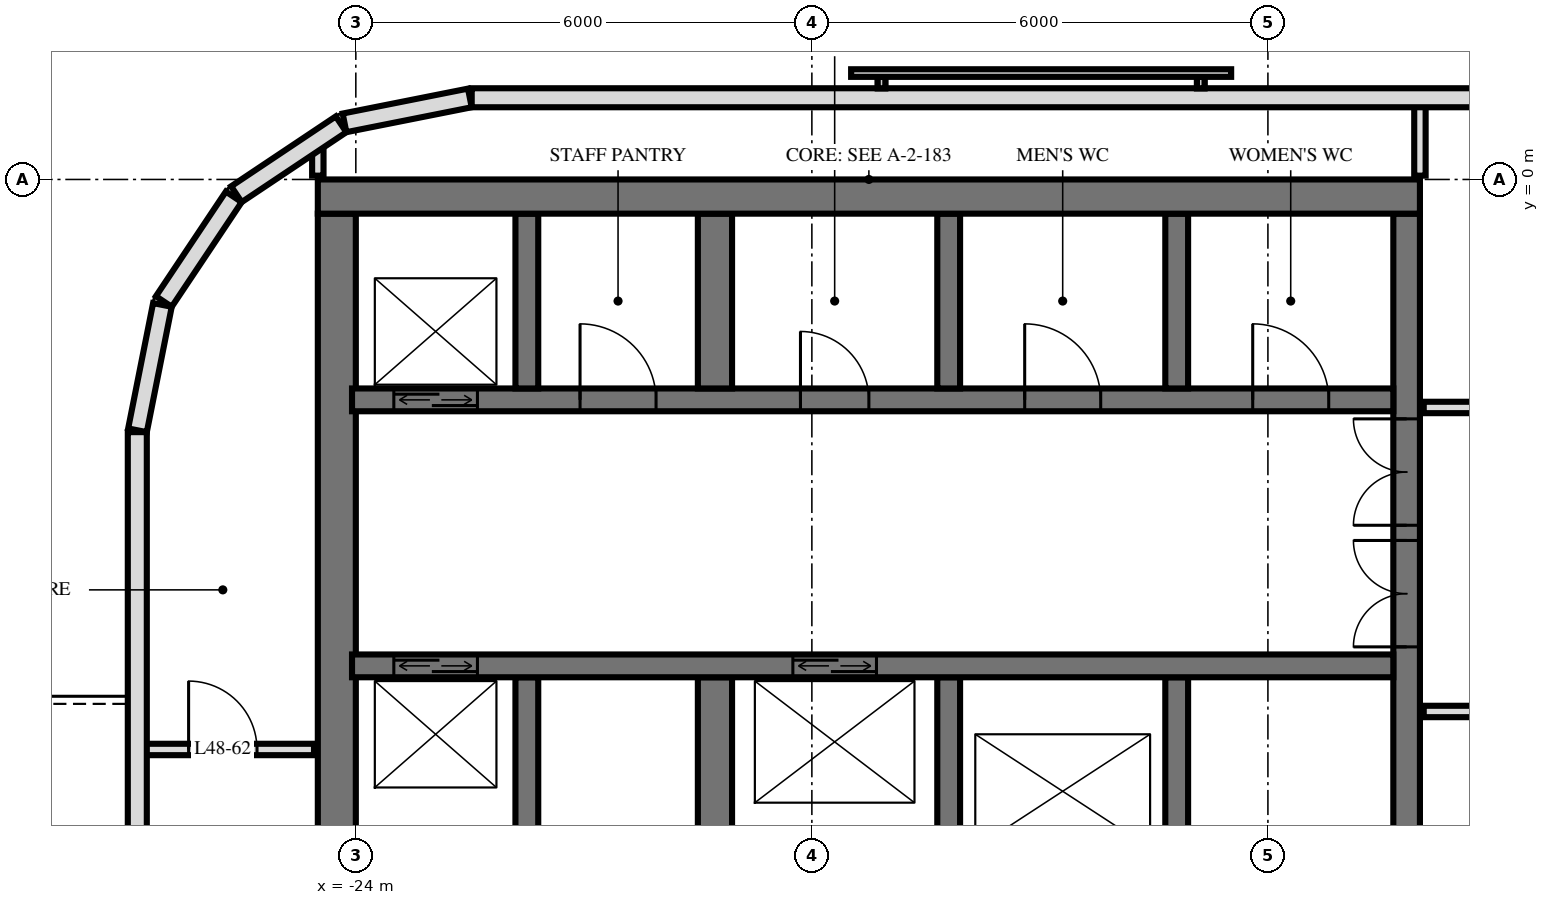
"""IFC4 building model, lengths in metres.
Left out: names, types, materials, properties, quantities, classifications, styles, units other than length and angle.
Written with IfcOpenShell. Run it as: python <this file> out.ifc"""

import sys

from ifc_helpers import new_model, si_unit, direction, frame, frame_2d, origin, place, context, subcontext, project, spatial, rectangle, extrude, element, fill, save


model = new_model("IFC4")
c1 = context("Model", 3, precision=1e-05, world=origin(), true_north=direction((0.0, 1.0)))
c2 = subcontext(c1, "Body", "Model", "MODEL_VIEW")
j1 = project(units=[si_unit("LENGTHUNIT", "METRE"), si_unit("PLANEANGLEUNIT", "RADIAN")], contexts=[c1])
p1 = place(None, origin())
s1 = spatial("IfcSite", under=j1, at=p1, CompositionType="ELEMENT")
p2 = place(p1, origin())
s2 = spatial("IfcBuilding", under=s1, at=p2, CompositionType="ELEMENT")
p3 = place(p2, frame((0.0, 0.0, 187.1)))
s3 = spatial("IfcBuildingStorey", under=s2, at=p3, CompositionType="ELEMENT", Elevation=187.1)
p4 = place(p3, frame((-24.5, -0.225, 0.0), z_axis=(0.0, 0.0, 1.0), x_axis=(1.0, 0.0, 0.0)))
e1 = element("IfcWall", 1, at=p4, inside=s3, PredefinedType="SHEAR", context=c2, shape_type="SweptSolid", body=[
    extrude(rectangle(XDim=14.5, YDim=0.45, at=frame_2d((7.25, 0.0))), origin(), (0.0, 0.0, 1.0), 3.5),
])
p5 = place(p3, frame((-10.175, -14.55, 0.0), z_axis=(0.0, 0.0, 1.0), x_axis=(0.0, 1.0, 0.0)))
e2 = element("IfcWall", 2, at=p5, inside=s3, PredefinedType="SHEAR", context=c2, shape_type="SweptSolid", body=[
    extrude(rectangle(XDim=14.1, YDim=0.35, at=frame_2d((7.05, 0.0))), origin(), (0.0, 0.0, 1.0), 3.5),
])
p6 = place(p5, frame((8.4, 0.0, 0.0)))
e3 = element("IfcOpeningElement", 3, at=p6, cuts=e2, PredefinedType="OPENING", context=c2, shape_type="SweptSolid", body=[
    extrude(rectangle(XDim=1.4, YDim=2.4, at=frame_2d((0.7, 1.2))), frame((0.0, 0.185, 0.0), z_axis=(0.0, -1.0, 0.0), x_axis=(1.0, 0.0, 0.0)), (0.0, 0.0, 1.0), 0.37),
])
p7 = place(p5, frame((10.0, 0.0, 0.0)))
e4 = element("IfcOpeningElement", 4, at=p7, cuts=e2, PredefinedType="OPENING", context=c2, shape_type="SweptSolid", body=[
    extrude(rectangle(XDim=1.4, YDim=2.4, at=frame_2d((0.7, 1.2))), frame((0.0, 0.185, 0.0), z_axis=(0.0, -1.0, 0.0), x_axis=(1.0, 0.0, 0.0)), (0.0, 0.0, 1.0), 0.37),
])
p8 = place(p5, frame((4.0, 0.0, 0.0)))
e5 = element("IfcOpeningElement", 5, at=p8, cuts=e2, PredefinedType="OPENING", context=c2, shape_type="SweptSolid", body=[
    extrude(rectangle(XDim=1.2, YDim=2.1, at=frame_2d((0.6, 1.05))), frame((0.0, 0.185, 0.0), z_axis=(0.0, -1.0, 0.0), x_axis=(1.0, 0.0, 0.0)), (0.0, 0.0, 1.0), 0.37),
])
p9 = place(p3, frame((-24.25, -14.55, 0.0), z_axis=(0.0, 0.0, 1.0), x_axis=(0.0, 1.0, 0.0)))
e6 = element("IfcWall", 6, at=p9, inside=s3, PredefinedType="SHEAR", context=c2, shape_type="SweptSolid", body=[
    extrude(rectangle(XDim=14.1, YDim=0.5, at=frame_2d((7.05, 0.0))), origin(), (0.0, 0.0, 1.0), 3.5),
])
p10 = place(p3, frame((-24.05, -2.9, 0.0), z_axis=(0.0, 0.0, 1.0), x_axis=(1.0, 0.0, 0.0)))
e7 = element("IfcWall", 7, at=p10, inside=s3, PredefinedType="SHEAR", context=c2, shape_type="SweptSolid", body=[
    extrude(rectangle(XDim=13.7, YDim=0.3, at=frame_2d((6.85, 0.0))), origin(), (0.0, 0.0, 1.0), 3.5),
])
p11 = place(p10, frame((0.55, 0.0, 0.0)))
e8 = element("IfcOpeningElement", 8, at=p11, cuts=e7, PredefinedType="OPENING", context=c2, shape_type="SweptSolid", body=[
    extrude(rectangle(XDim=1.1, YDim=2.1, at=frame_2d((0.55, 1.05))), frame((0.0, 0.16, 0.0), z_axis=(0.0, -1.0, 0.0), x_axis=(1.0, 0.0, 0.0)), (0.0, 0.0, 1.0), 0.32),
])
p12 = place(p10, frame((5.9, 0.0, 0.0)))
e9 = element("IfcOpeningElement", 9, at=p12, cuts=e7, PredefinedType="OPENING", context=c2, shape_type="SweptSolid", body=[
    extrude(rectangle(XDim=0.9, YDim=2.1, at=frame_2d((0.45, 1.05))), frame((0.0, 0.16, 0.0), z_axis=(0.0, -1.0, 0.0), x_axis=(1.0, 0.0, 0.0)), (0.0, 0.0, 1.0), 0.32),
])
p13 = place(p10, frame((11.85, 0.0, 0.0)))
e10 = element("IfcOpeningElement", 10, at=p13, cuts=e7, PredefinedType="OPENING", context=c2, shape_type="SweptSolid", body=[
    extrude(rectangle(XDim=1.0, YDim=2.1, at=frame_2d((0.5, 1.05))), frame((0.0, 0.16, 0.0), z_axis=(0.0, -1.0, 0.0), x_axis=(1.0, 0.0, 0.0)), (0.0, 0.0, 1.0), 0.32),
])
p14 = place(p10, frame((8.85, 0.0, 0.0)))
e11 = element("IfcOpeningElement", 11, at=p14, cuts=e7, PredefinedType="OPENING", context=c2, shape_type="SweptSolid", body=[
    extrude(rectangle(XDim=1.0, YDim=2.1, at=frame_2d((0.5, 1.05))), frame((0.0, 0.16, 0.0), z_axis=(0.0, -1.0, 0.0), x_axis=(1.0, 0.0, 0.0)), (0.0, 0.0, 1.0), 0.32),
])
p15 = place(p10, frame((3.0, 0.0, 0.0)))
e12 = element("IfcOpeningElement", 12, at=p15, cuts=e7, PredefinedType="OPENING", context=c2, shape_type="SweptSolid", body=[
    extrude(rectangle(XDim=1.0, YDim=2.1, at=frame_2d((0.5, 1.05))), frame((0.0, 0.16, 0.0), z_axis=(0.0, -1.0, 0.0), x_axis=(1.0, 0.0, 0.0)), (0.0, 0.0, 1.0), 0.32),
])
p16 = place(p3, frame((-24.05, -6.4, 0.0), z_axis=(0.0, 0.0, 1.0), x_axis=(1.0, 0.0, 0.0)))
e13 = element("IfcWall", 13, at=p16, inside=s3, PredefinedType="SHEAR", context=c2, shape_type="SweptSolid", body=[
    extrude(rectangle(XDim=13.7, YDim=0.3, at=frame_2d((6.85, 0.0))), origin(), (0.0, 0.0, 1.0), 3.5),
])
p17 = place(p16, frame((0.55, 0.0, 0.0)))
e14 = element("IfcOpeningElement", 14, at=p17, cuts=e13, PredefinedType="OPENING", context=c2, shape_type="SweptSolid", body=[
    extrude(rectangle(XDim=1.1, YDim=2.1, at=frame_2d((0.55, 1.05))), frame((0.0, 0.16, 0.0), z_axis=(0.0, -1.0, 0.0), x_axis=(1.0, 0.0, 0.0)), (0.0, 0.0, 1.0), 0.32),
])
p18 = place(p16, frame((5.8, 0.0, 0.0)))
e15 = element("IfcOpeningElement", 15, at=p18, cuts=e13, PredefinedType="OPENING", context=c2, shape_type="SweptSolid", body=[
    extrude(rectangle(XDim=1.1, YDim=2.1, at=frame_2d((0.55, 1.05))), frame((0.0, 0.16, 0.0), z_axis=(0.0, -1.0, 0.0), x_axis=(1.0, 0.0, 0.0)), (0.0, 0.0, 1.0), 0.32),
])
for number, where, z_axis, x_axis in (
    (16, (-13.2, -2.75, 0.0), (0.0, 0.0, 1.0), (0.0, 1.0, 0.0)),
    (17, (-13.2, -8.85, 0.0), (0.0, 0.0, 1.0), (0.0, 1.0, 0.0)),
    (18, (-16.2, -2.75, 0.0), (0.0, 0.0, 1.0), (0.0, 1.0, 0.0)),
    (19, (-16.2, -8.85, 0.0), (0.0, 0.0, 1.0), (0.0, 1.0, 0.0)),
):
    element("IfcWall", number, at=place(p3, frame(where, z_axis=z_axis, x_axis=x_axis)), inside=s3, PredefinedType="SHEAR", context=c2, shape_type="SweptSolid", body=[
        extrude(rectangle(XDim=2.3, YDim=0.3, at=frame_2d((1.15, 0.0))), origin(), (0.0, 0.0, 1.0), 3.5),
    ])
for number, where, z_axis, x_axis in (
    (20, (-19.275, -2.75, 0.0), (0.0, 0.0, 1.0), (0.0, 1.0, 0.0)),
    (21, (-19.275, -8.85, 0.0), (0.0, 0.0, 1.0), (0.0, 1.0, 0.0)),
):
    element("IfcWall", number, at=place(p3, frame(where, z_axis=z_axis, x_axis=x_axis)), inside=s3, PredefinedType="SHEAR", context=c2, shape_type="SweptSolid", body=[
        extrude(rectangle(XDim=2.3, YDim=0.45, at=frame_2d((1.15, 0.0))), origin(), (0.0, 0.0, 1.0), 3.5),
    ])
for number, where, z_axis, x_axis in (
    (22, (-21.75, -2.75, 0.0), (0.0, 0.0, 1.0), (0.0, 1.0, 0.0)),
    (23, (-21.75, -8.85, 0.0), (0.0, 0.0, 1.0), (0.0, 1.0, 0.0)),
):
    element("IfcWall", number, at=place(p3, frame(where, z_axis=z_axis, x_axis=x_axis)), inside=s3, PredefinedType="SHEAR", context=c2, shape_type="SweptSolid", body=[
        extrude(rectangle(XDim=2.3, YDim=0.3, at=frame_2d((1.15, 0.0))), origin(), (0.0, 0.0, 1.0), 3.5),
    ])
p19 = place(p3, frame((22.475, 1.075, 0.0), z_axis=(0.0, 0.0, 1.0), x_axis=(-1.0, 0.0, 0.0)))
e24 = element("IfcWall", 24, at=p19, inside=s3, PredefinedType="SOLIDWALL", context=c2, shape_type="SweptSolid", body=[
    extrude(rectangle(XDim=44.951, YDim=0.25, at=frame_2d((22.475, 0.0))), origin(), (0.0, 0.0, 1.0), 3.22),
])
p20 = place(p19, frame((15.275, 0.0, 0.9)))
e25 = element("IfcOpeningElement", 25, at=p20, cuts=e24, PredefinedType="OPENING", context=c2, shape_type="SweptSolid", body=[
    extrude(rectangle(XDim=2.4, YDim=1.5, at=frame_2d((1.2, 0.75))), frame((0.0, 0.135, 0.0), z_axis=(0.0, -1.0, 0.0), x_axis=(1.0, 0.0, 0.0)), (0.0, 0.0, 1.0), 0.27),
])
p21 = place(p19, frame((21.275, 0.0, 0.9)))
e26 = element("IfcOpeningElement", 26, at=p21, cuts=e24, PredefinedType="OPENING", context=c2, shape_type="SweptSolid", body=[
    extrude(rectangle(XDim=2.4, YDim=1.5, at=frame_2d((1.2, 0.75))), frame((0.0, 0.135, 0.0), z_axis=(0.0, -1.0, 0.0), x_axis=(1.0, 0.0, 0.0)), (0.0, 0.0, 1.0), 0.27),
])
p22 = place(p19, frame((24.275, 0.0, 0.9)))
e27 = element("IfcOpeningElement", 27, at=p22, cuts=e24, PredefinedType="OPENING", context=c2, shape_type="SweptSolid", body=[
    extrude(rectangle(XDim=2.4, YDim=1.5, at=frame_2d((1.2, 0.75))), frame((0.0, 0.135, 0.0), z_axis=(0.0, -1.0, 0.0), x_axis=(1.0, 0.0, 0.0)), (0.0, 0.0, 1.0), 0.27),
])
p23 = place(p3, frame((-22.5, 1.073, 0.0), z_axis=(0.0, 0.0, 1.0), x_axis=(-0.980803419081, -0.194999110559, 0.0)))
e28 = element("IfcWall", 28, at=p23, inside=s3, PredefinedType="SOLIDWALL", context=c2, shape_type="SweptSolid", body=[
    extrude(rectangle(XDim=1.681, YDim=0.25, at=frame_2d((0.841, 0.0))), origin(), (0.0, 0.0, 1.0), 3.22),
])
for number, where, z_axis, x_axis in (
    (29, (-24.194, 0.726, 0.0), (0.0, 0.0, 1.0), (-0.831, -0.556, 0.0)),
    (30, (-25.606, -0.229, 0.0), (0.0, 0.0, 1.0), (-0.556, -0.831, 0.0)),
):
    element("IfcWall", number, at=place(p3, frame(where, z_axis=z_axis, x_axis=x_axis)), inside=s3, PredefinedType="SOLIDWALL", context=c2, shape_type="SweptSolid", body=[
        extrude(rectangle(XDim=1.656, YDim=0.25, at=frame_2d((0.828, 0.0))), origin(), (0.0, 0.0, 1.0), 3.22),
    ])
p24 = place(p3, frame((-26.545, -1.651, 0.0), z_axis=(0.0, 0.0, 1.0), x_axis=(-0.194999110559, -0.980803419081, 0.0)))
e31 = element("IfcWall", 31, at=p24, inside=s3, PredefinedType="SOLIDWALL", context=c2, shape_type="SweptSolid", body=[
    extrude(rectangle(XDim=1.681, YDim=0.25, at=frame_2d((0.841, 0.0))), origin(), (0.0, 0.0, 1.0), 3.22),
])
p25 = place(p3, frame((-26.875, -3.325, 0.0), z_axis=(0.0, 0.0, 1.0), x_axis=(0.0, -1.0, 0.0)))
e32 = element("IfcWall", 32, at=p25, inside=s3, PredefinedType="SOLIDWALL", context=c2, shape_type="SweptSolid", body=[
    extrude(rectangle(XDim=21.551, YDim=0.25, at=frame_2d((10.775, 0.0))), origin(), (0.0, 0.0, 1.0), 3.22),
])
p26 = place(p25, frame((7.025, 0.0, 0.0)))
e33 = element("IfcOpeningElement", 33, at=p26, cuts=e32, PredefinedType="OPENING", context=c2, shape_type="SweptSolid", body=[
    extrude(rectangle(XDim=1.8, YDim=2.4, at=frame_2d((0.9, 1.2))), frame((0.0, 0.135, 0.0), z_axis=(0.0, -1.0, 0.0), x_axis=(1.0, 0.0, 0.0)), (0.0, 0.0, 1.0), 0.27),
])
p27 = place(p25, frame((14.075, 0.0, 0.0)))
e34 = element("IfcOpeningElement", 34, at=p27, cuts=e32, PredefinedType="OPENING", context=c2, shape_type="SweptSolid", body=[
    extrude(rectangle(XDim=1.8, YDim=2.4, at=frame_2d((0.9, 1.2))), frame((0.0, 0.135, 0.0), z_axis=(0.0, -1.0, 0.0), x_axis=(1.0, 0.0, 0.0)), (0.0, 0.0, 1.0), 0.27),
])
p28 = place(p25, frame((18.875, 0.0, 0.0)))
e35 = element("IfcOpeningElement", 35, at=p28, cuts=e32, PredefinedType="OPENING", context=c2, shape_type="SweptSolid", body=[
    extrude(rectangle(XDim=1.8, YDim=2.4, at=frame_2d((0.9, 1.2))), frame((0.0, 0.135, 0.0), z_axis=(0.0, -1.0, 0.0), x_axis=(1.0, 0.0, 0.0)), (0.0, 0.0, 1.0), 0.27),
])
p29 = place(p3, frame((-10.0, 0.05, 0.0), z_axis=(0.0, 0.0, 1.0), x_axis=(0.0, 1.0, 0.0)))
e36 = element("IfcWall", 36, at=p29, inside=s3, PredefinedType="PLUMBINGWALL", context=c2, shape_type="SweptSolid", body=[
    extrude(rectangle(XDim=0.97, YDim=0.15, at=frame_2d((0.485, 0.0))), origin(), (0.0, 0.0, 1.0), 3.22),
])
p30 = place(p3, frame((-24.5, 0.05, 0.0), z_axis=(0.0, 0.0, 1.0), x_axis=(0.0, 1.0, 0.0)))
e37 = element("IfcWall", 37, at=p30, inside=s3, PredefinedType="PARTITIONING", context=c2, shape_type="SweptSolid", body=[
    extrude(rectangle(XDim=0.405, YDim=0.15, at=frame_2d((0.203, 0.0))), origin(), (0.0, 0.0, 1.0), 3.22),
])
p31 = place(p3, frame((-26.82, -7.5, 0.0), z_axis=(0.0, 0.0, 1.0), x_axis=(1.0, 0.0, 0.0)))
e38 = element("IfcWall", 38, at=p31, inside=s3, PredefinedType="PARTITIONING", context=c2, shape_type="SweptSolid", body=[
    extrude(rectangle(XDim=2.27, YDim=0.15, at=frame_2d((1.135, 0.0))), origin(), (0.0, 0.0, 1.0), 3.22),
])
p32 = place(p31, frame((0.62, 0.0, 0.0)))
e39 = element("IfcOpeningElement", 39, at=p32, cuts=e38, PredefinedType="OPENING", context=c2, shape_type="SweptSolid", body=[
    extrude(rectangle(XDim=0.9, YDim=2.1, at=frame_2d((0.45, 1.05))), frame((0.0, 0.085, 0.0), z_axis=(0.0, -1.0, 0.0), x_axis=(1.0, 0.0, 0.0)), (0.0, 0.0, 1.0), 0.17),
])
p33 = place(p3, frame((-9.95, -7.0, 0.0), z_axis=(0.0, 0.0, 1.0), x_axis=(1.0, 0.0, 0.0)))
e40 = element("IfcWall", 40, at=p33, inside=s3, PredefinedType="PARTITIONING", context=c2, shape_type="SweptSolid", body=[
    extrude(rectangle(XDim=19.9, YDim=0.15, at=frame_2d((9.95, 0.0))), origin(), (0.0, 0.0, 1.0), 3.22),
])
p34 = place(p33, frame((9.45, 0.0, 0.0)))
e41 = element("IfcOpeningElement", 41, at=p34, cuts=e40, PredefinedType="OPENING", context=c2, shape_type="SweptSolid", body=[
    extrude(rectangle(XDim=1.0, YDim=2.1, at=frame_2d((0.5, 1.05))), frame((0.0, 0.085, 0.0), z_axis=(0.0, -1.0, 0.0), x_axis=(1.0, 0.0, 0.0)), (0.0, 0.0, 1.0), 0.17),
])
p35 = place(p33, frame((3.45, 0.0, 0.0)))
e42 = element("IfcOpeningElement", 42, at=p35, cuts=e40, PredefinedType="OPENING", context=c2, shape_type="SweptSolid", body=[
    extrude(rectangle(XDim=1.0, YDim=2.1, at=frame_2d((0.5, 1.05))), frame((0.0, 0.085, 0.0), z_axis=(0.0, -1.0, 0.0), x_axis=(1.0, 0.0, 0.0)), (0.0, 0.0, 1.0), 0.17),
])
p36 = place(p3, frame((-9.95, -3.0, 0.0), z_axis=(0.0, 0.0, 1.0), x_axis=(1.0, 0.0, 0.0)))
e43 = element("IfcWall", 43, at=p36, inside=s3, PredefinedType="PARTITIONING", context=c2, shape_type="SweptSolid", body=[
    extrude(rectangle(XDim=19.9, YDim=0.15, at=frame_2d((9.95, 0.0))), origin(), (0.0, 0.0, 1.0), 3.22),
])
p37 = place(p36, frame((0.95, 0.0, 0.0)))
e44 = element("IfcOpeningElement", 44, at=p37, cuts=e43, PredefinedType="OPENING", context=c2, shape_type="SweptSolid", body=[
    extrude(rectangle(XDim=1.0, YDim=2.1, at=frame_2d((0.5, 1.05))), frame((0.0, 0.085, 0.0), z_axis=(0.0, -1.0, 0.0), x_axis=(1.0, 0.0, 0.0)), (0.0, 0.0, 1.0), 0.17),
])
p38 = place(p36, frame((3.7, 0.0, 0.0)))
e45 = element("IfcOpeningElement", 45, at=p38, cuts=e43, PredefinedType="OPENING", context=c2, shape_type="SweptSolid", body=[
    extrude(rectangle(XDim=1.0, YDim=2.1, at=frame_2d((0.5, 1.05))), frame((0.0, 0.085, 0.0), z_axis=(0.0, -1.0, 0.0), x_axis=(1.0, 0.0, 0.0)), (0.0, 0.0, 1.0), 0.17),
])
p39 = place(p36, frame((8.45, 0.0, 0.0)))
e46 = element("IfcOpeningElement", 46, at=p39, cuts=e43, PredefinedType="OPENING", context=c2, shape_type="SweptSolid", body=[
    extrude(rectangle(XDim=1.0, YDim=2.1, at=frame_2d((0.5, 1.05))), frame((0.0, 0.085, 0.0), z_axis=(0.0, -1.0, 0.0), x_axis=(1.0, 0.0, 0.0)), (0.0, 0.0, 1.0), 0.17),
])
p40 = place(p36, frame((15.7, 0.0, 0.0)))
e47 = element("IfcOpeningElement", 47, at=p40, cuts=e43, PredefinedType="OPENING", context=c2, shape_type="SweptSolid", body=[
    extrude(rectangle(XDim=1.0, YDim=2.1, at=frame_2d((0.5, 1.05))), frame((0.0, 0.085, 0.0), z_axis=(0.0, -1.0, 0.0), x_axis=(1.0, 0.0, 0.0)), (0.0, 0.0, 1.0), 0.17),
])
p41 = place(p11, origin())
e48 = element("IfcDoor", 48, at=p41, inside=s3, OperationType="DOUBLE_DOOR_SLIDING", PredefinedType="USERDEFINED", context=c2, shape_type="SweptSolid", body=[
    extrude(rectangle(XDim=1.1, YDim=2.1, at=frame_2d((0.55, 1.05))), frame((0.0, 0.025, 0.0), z_axis=(0.0, -1.0, 0.0), x_axis=(1.0, 0.0, 0.0)), (0.0, 0.0, 1.0), 0.05),
])
fill(e8, e48)
p42 = place(p17, origin())
e49 = element("IfcDoor", 49, at=p42, inside=s3, OperationType="DOUBLE_DOOR_SLIDING", PredefinedType="USERDEFINED", context=c2, shape_type="SweptSolid", body=[
    extrude(rectangle(XDim=1.1, YDim=2.1, at=frame_2d((0.55, 1.05))), frame((0.0, 0.025, 0.0), z_axis=(0.0, -1.0, 0.0), x_axis=(1.0, 0.0, 0.0)), (0.0, 0.0, 1.0), 0.05),
])
fill(e14, e49)
p43 = place(p18, origin())
e50 = element("IfcDoor", 50, at=p43, inside=s3, OperationType="DOUBLE_DOOR_SLIDING", PredefinedType="USERDEFINED", context=c2, shape_type="SweptSolid", body=[
    extrude(rectangle(XDim=1.1, YDim=2.1, at=frame_2d((0.55, 1.05))), frame((0.0, 0.025, 0.0), z_axis=(0.0, -1.0, 0.0), x_axis=(1.0, 0.0, 0.0)), (0.0, 0.0, 1.0), 0.05),
])
fill(e15, e50)
p44 = place(p6, origin())
e51 = element("IfcDoor", 51, at=p44, inside=s3, OperationType="DOUBLE_DOOR_SINGLE_SWING", PredefinedType="DOOR", context=c2, shape_type="SweptSolid", body=[
    extrude(rectangle(XDim=1.4, YDim=2.4, at=frame_2d((0.7, 1.2))), frame((0.0, 0.025, 0.0), z_axis=(0.0, -1.0, 0.0), x_axis=(1.0, 0.0, 0.0)), (0.0, 0.0, 1.0), 0.05),
])
fill(e3, e51)
p45 = place(p7, origin())
e52 = element("IfcDoor", 52, at=p45, inside=s3, OperationType="DOUBLE_DOOR_SINGLE_SWING", PredefinedType="DOOR", context=c2, shape_type="SweptSolid", body=[
    extrude(rectangle(XDim=1.4, YDim=2.4, at=frame_2d((0.7, 1.2))), frame((0.0, 0.025, 0.0), z_axis=(0.0, -1.0, 0.0), x_axis=(1.0, 0.0, 0.0)), (0.0, 0.0, 1.0), 0.05),
])
fill(e4, e52)
p46 = place(p12, origin())
e53 = element("IfcDoor", 53, at=p46, inside=s3, OperationType="SINGLE_SWING_RIGHT", PredefinedType="DOOR", context=c2, shape_type="SweptSolid", body=[
    extrude(rectangle(XDim=0.9, YDim=2.1, at=frame_2d((0.45, 1.05))), frame((0.0, 0.025, 0.0), z_axis=(0.0, -1.0, 0.0), x_axis=(1.0, 0.0, 0.0)), (0.0, 0.0, 1.0), 0.05),
])
fill(e9, e53)
p47 = place(p13, origin())
e54 = element("IfcDoor", 54, at=p47, inside=s3, OperationType="SINGLE_SWING_RIGHT", PredefinedType="DOOR", context=c2, shape_type="SweptSolid", body=[
    extrude(rectangle(XDim=1.0, YDim=2.1, at=frame_2d((0.5, 1.05))), frame((0.0, 0.025, 0.0), z_axis=(0.0, -1.0, 0.0), x_axis=(1.0, 0.0, 0.0)), (0.0, 0.0, 1.0), 0.05),
])
fill(e10, e54)
p48 = place(p14, origin())
e55 = element("IfcDoor", 55, at=p48, inside=s3, OperationType="SINGLE_SWING_RIGHT", PredefinedType="DOOR", context=c2, shape_type="SweptSolid", body=[
    extrude(rectangle(XDim=1.0, YDim=2.1, at=frame_2d((0.5, 1.05))), frame((0.0, 0.025, 0.0), z_axis=(0.0, -1.0, 0.0), x_axis=(1.0, 0.0, 0.0)), (0.0, 0.0, 1.0), 0.05),
])
fill(e11, e55)
p49 = place(p15, origin())
e56 = element("IfcDoor", 56, at=p49, inside=s3, OperationType="SINGLE_SWING_RIGHT", PredefinedType="DOOR", context=c2, shape_type="SweptSolid", body=[
    extrude(rectangle(XDim=1.0, YDim=2.1, at=frame_2d((0.5, 1.05))), frame((0.0, 0.025, 0.0), z_axis=(0.0, -1.0, 0.0), x_axis=(1.0, 0.0, 0.0)), (0.0, 0.0, 1.0), 0.05),
])
fill(e12, e56)
p50 = place(p32, origin())
e57 = element("IfcDoor", 57, at=p50, inside=s3, OperationType="SINGLE_SWING_RIGHT", PredefinedType="DOOR", context=c2, shape_type="SweptSolid", body=[
    extrude(rectangle(XDim=0.9, YDim=2.1, at=frame_2d((0.45, 1.05))), frame((0.0, 0.025, 0.0), z_axis=(0.0, -1.0, 0.0), x_axis=(1.0, 0.0, 0.0)), (0.0, 0.0, 1.0), 0.05),
])
fill(e39, e57)
save(model, sys.argv[1])
